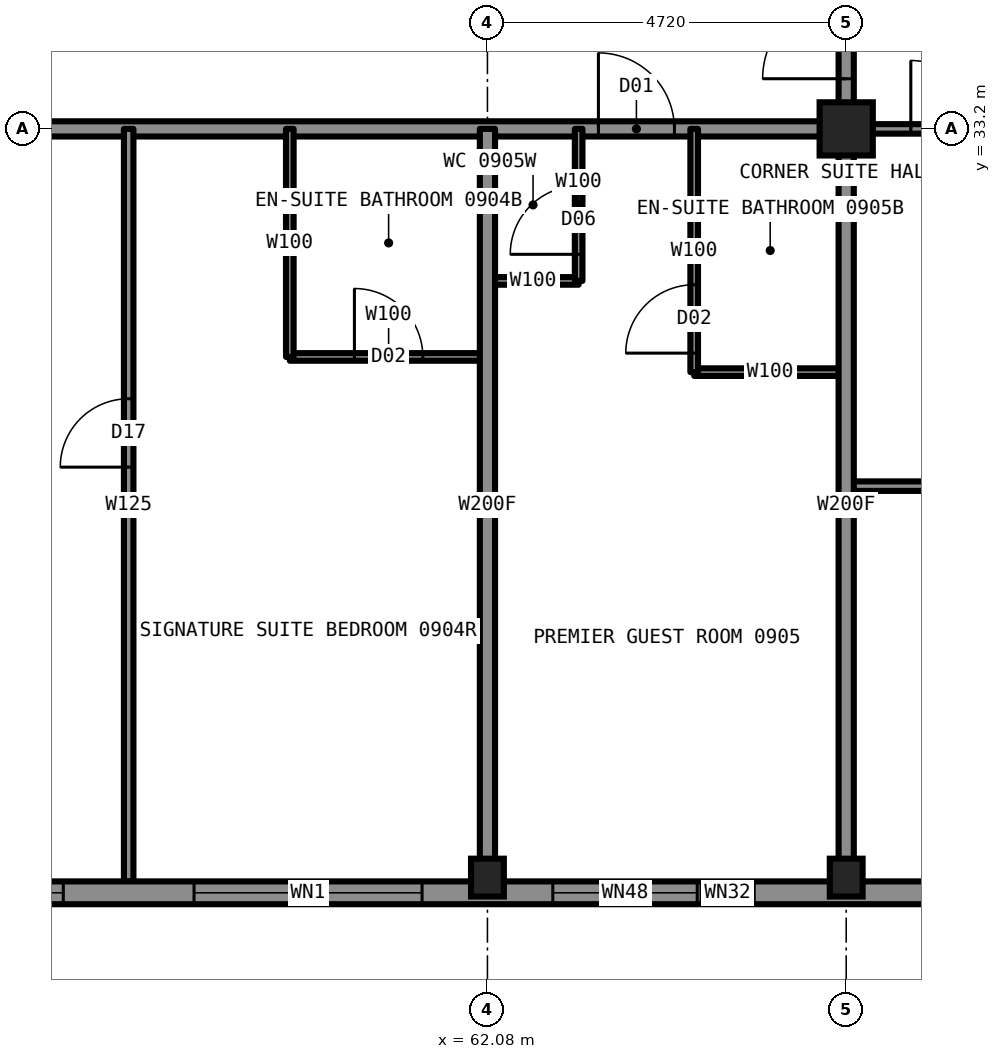
"""IFC4 building model, lengths in metres.
Left out: names, types, materials, properties, quantities, classifications, styles, units other than length and angle.
Written with IfcOpenShell. Run it as: python <this file> out.ifc"""

import sys

from ifc_helpers import new_model, si_unit, direction, frame, frame_2d, origin, origin_2d, place, context, subcontext, project, spatial, rectangle, hollow_rectangle, i_section, extrude, element, fill, save


model = new_model("IFC4")
c1 = context("Model", 3, precision=1e-05, world=origin(), true_north=direction((0.0, 1.0)))
c2 = subcontext(c1, "Body", "Model", "MODEL_VIEW")
j1 = project(units=[si_unit("LENGTHUNIT", "METRE"), si_unit("PLANEANGLEUNIT", "RADIAN")], contexts=[c1])
p1 = place(None, origin())
s1 = spatial("IfcSite", under=j1, at=p1, CompositionType="ELEMENT")
p2 = place(p1, origin())
s2 = spatial("IfcBuilding", under=s1, at=p2, CompositionType="ELEMENT")
p3 = place(p2, frame((0.0, 0.0, 39.0)))
s3 = spatial("IfcBuildingStorey", under=s2, at=p3, CompositionType="ELEMENT", Elevation=39.0)
for number, where, z_axis, x_axis in (
    (1, (62.08, 23.35, 0.0), (0.0, 0.0, 1.0), (1.0, 0.0, 0.0)),
    (2, (66.8, 23.35, 0.0), (0.0, 0.0, 1.0), (1.0, 0.0, 0.0)),
):
    element("IfcColumn", number, at=place(p3, frame(where, z_axis=z_axis, x_axis=x_axis)), inside=s3, PredefinedType="COLUMN", context=c2, shape_type="SweptSolid", body=[
        extrude(i_section(OverallWidth=0.432, OverallDepth=0.498, WebThickness=0.056, FlangeThickness=0.089, at=origin_2d()), origin(), (0.0, 0.0, 1.0), 3.5),
    ])
p4 = place(p3, frame((66.8, 33.2, 0.0), z_axis=(0.0, 0.0, 1.0), x_axis=(1.0, 0.0, 0.0)))
e3 = element("IfcColumn", 3, at=p4, inside=s3, PredefinedType="COLUMN", context=c2, shape_type="SweptSolid", body=[
    extrude(hollow_rectangle(XDim=0.7, YDim=0.7, WallThickness=0.06, at=origin_2d()), origin(), (0.0, 0.0, 1.0), 3.5),
])
p5 = place(p3, frame((43.2, 33.2, 0.0), z_axis=(0.0, 0.0, 1.0), x_axis=(1.0, 0.0, 0.0)))
e4 = element("IfcWall", 4, at=p5, inside=s3, PredefinedType="PARTITIONING", context=c2, shape_type="SweptSolid", body=[
    extrude(rectangle(XDim=23.6, YDim=0.2, at=frame_2d((11.8, 0.0))), origin(), (0.0, 0.0, 1.0), 3.33),
])
p6 = place(p5, frame((2.55, 0.0, 0.0)))
e5 = element("IfcOpeningElement", 5, at=p6, cuts=e4, PredefinedType="OPENING", context=c2, shape_type="SweptSolid", body=[
    extrude(rectangle(XDim=1.0, YDim=2.2, at=frame_2d((0.5, 1.1))), frame((0.0, 0.11, 0.0), z_axis=(0.0, -1.0, 0.0), x_axis=(1.0, 0.0, 0.0)), (0.0, 0.0, 1.0), 0.22),
])
p7 = place(p5, frame((6.57, 0.0, 0.0)))
e6 = element("IfcOpeningElement", 6, at=p7, cuts=e4, PredefinedType="OPENING", context=c2, shape_type="SweptSolid", body=[
    extrude(rectangle(XDim=1.1, YDim=2.2, at=frame_2d((0.55, 1.1))), frame((0.0, 0.11, 0.0), z_axis=(0.0, -1.0, 0.0), x_axis=(1.0, 0.0, 0.0)), (0.0, 0.0, 1.0), 0.22),
])
p8 = place(p5, frame((20.34, 0.0, 0.0)))
e7 = element("IfcOpeningElement", 7, at=p8, cuts=e4, PredefinedType="OPENING", context=c2, shape_type="SweptSolid", body=[
    extrude(rectangle(XDim=1.0, YDim=2.2, at=frame_2d((0.5, 1.1))), frame((0.0, 0.11, 0.0), z_axis=(0.0, -1.0, 0.0), x_axis=(1.0, 0.0, 0.0)), (0.0, 0.0, 1.0), 0.22),
])
p9 = place(p3, frame((66.8, 33.2, 0.0), z_axis=(0.0, 0.0, 1.0), x_axis=(1.0, 0.0, 0.0)))
e8 = element("IfcWall", 8, at=p9, inside=s3, PredefinedType="PARTITIONING", context=c2, shape_type="SweptSolid", body=[
    extrude(rectangle(XDim=9.9, YDim=0.125, at=frame_2d((4.95, 0.0))), origin(), (0.0, 0.0, 1.0), 2.573),
])
p10 = place(p9, frame((0.85, 0.0, 0.0)))
e9 = element("IfcOpeningElement", 9, at=p10, cuts=e8, PredefinedType="OPENING", context=c2, shape_type="SweptSolid", body=[
    extrude(rectangle(XDim=0.9, YDim=2.2, at=frame_2d((0.45, 1.1))), frame((0.0, 0.073, 0.0), z_axis=(0.0, -1.0, 0.0), x_axis=(1.0, 0.0, 0.0)), (0.0, 0.0, 1.0), 0.145),
])
p11 = place(p3, frame((62.08, 31.2, 0.0), z_axis=(0.0, 0.0, 1.0), x_axis=(1.0, 0.0, 0.0)))
e10 = element("IfcWall", 10, at=p11, inside=s3, PredefinedType="PARTITIONING", context=c2, shape_type="SweptSolid", body=[
    extrude(rectangle(XDim=1.2, YDim=0.1, at=frame_2d((0.6, 0.0))), origin(), (0.0, 0.0, 1.0), 3.33),
])
p12 = place(p3, frame((59.48, 30.2, 0.0), z_axis=(0.0, 0.0, 1.0), x_axis=(1.0, 0.0, 0.0)))
e11 = element("IfcWall", 11, at=p12, inside=s3, PredefinedType="PARTITIONING", context=c2, shape_type="SweptSolid", body=[
    extrude(rectangle(XDim=2.6, YDim=0.1, at=frame_2d((1.3, 0.0))), origin(), (0.0, 0.0, 1.0), 3.33),
])
p13 = place(p12, frame((0.85, 0.0, 0.0)))
e12 = element("IfcOpeningElement", 12, at=p13, cuts=e11, PredefinedType="OPENING", context=c2, shape_type="SweptSolid", body=[
    extrude(rectangle(XDim=0.9, YDim=2.1, at=frame_2d((0.45, 1.05))), frame((0.0, 0.06, 0.0), z_axis=(0.0, -1.0, 0.0), x_axis=(1.0, 0.0, 0.0)), (0.0, 0.0, 1.0), 0.12),
])
p14 = place(p3, frame((64.8, 30.0, 0.0), z_axis=(0.0, 0.0, 1.0), x_axis=(1.0, 0.0, 0.0)))
e13 = element("IfcWall", 13, at=p14, inside=s3, PredefinedType="PARTITIONING", context=c2, shape_type="SweptSolid", body=[
    extrude(rectangle(XDim=2.0, YDim=0.1, at=frame_2d((1.0, 0.0))), origin(), (0.0, 0.0, 1.0), 3.33),
])
p15 = place(p3, frame((66.8, 28.5, 0.0), z_axis=(0.0, 0.0, 1.0), x_axis=(1.0, 0.0, 0.0)))
e14 = element("IfcWall", 14, at=p15, inside=s3, PredefinedType="PARTITIONING", context=c2, shape_type="SweptSolid", body=[
    extrude(rectangle(XDim=9.894, YDim=0.125, at=frame_2d((4.947, 0.0))), origin(), (0.0, 0.0, 1.0), 3.33),
])
p16 = place(p15, frame((1.75, 0.0, 0.0)))
e15 = element("IfcOpeningElement", 15, at=p16, cuts=e14, PredefinedType="OPENING", context=c2, shape_type="SweptSolid", body=[
    extrude(rectangle(XDim=0.9, YDim=2.2, at=frame_2d((0.45, 1.1))), frame((0.0, 0.073, 0.0), z_axis=(0.0, -1.0, 0.0), x_axis=(1.0, 0.0, 0.0)), (0.0, 0.0, 1.0), 0.145),
])
p17 = place(p3, frame((66.8, 33.2, 0.0), z_axis=(0.0, 0.0, 1.0), x_axis=(0.0, 1.0, 0.0)))
e16 = element("IfcWall", 16, at=p17, inside=s3, PredefinedType="PARTITIONING", context=c2, shape_type="SweptSolid", body=[
    extrude(rectangle(XDim=23.58, YDim=0.2, at=frame_2d((11.79, 0.0))), origin(), (0.0, 0.0, 1.0), 3.33),
])
p18 = place(p17, frame((7.72, 0.0, 0.0)))
e17 = element("IfcOpeningElement", 17, at=p18, cuts=e16, PredefinedType="OPENING", context=c2, shape_type="SweptSolid", body=[
    extrude(rectangle(XDim=1.0, YDim=2.2, at=frame_2d((0.5, 1.1))), frame((0.0, 0.11, 0.0), z_axis=(0.0, -1.0, 0.0), x_axis=(1.0, 0.0, 0.0)), (0.0, 0.0, 1.0), 0.22),
])
p19 = place(p17, frame((17.31, 0.0, 0.0)))
e18 = element("IfcOpeningElement", 18, at=p19, cuts=e16, PredefinedType="OPENING", context=c2, shape_type="SweptSolid", body=[
    extrude(rectangle(XDim=1.0, YDim=2.2, at=frame_2d((0.5, 1.1))), frame((0.0, 0.11, 0.0), z_axis=(0.0, -1.0, 0.0), x_axis=(1.0, 0.0, 0.0)), (0.0, 0.0, 1.0), 0.22),
])
p20 = place(p17, frame((21.84, 0.0, 0.0)))
e19 = element("IfcOpeningElement", 19, at=p20, cuts=e16, PredefinedType="OPENING", context=c2, shape_type="SweptSolid", body=[
    extrude(rectangle(XDim=1.1, YDim=2.2, at=frame_2d((0.55, 1.1))), frame((0.0, 0.11, 0.0), z_axis=(0.0, -1.0, 0.0), x_axis=(1.0, 0.0, 0.0)), (0.0, 0.0, 1.0), 0.22),
])
p21 = place(p17, frame((0.66, 0.0, 0.0)))
e20 = element("IfcOpeningElement", 20, at=p21, cuts=e16, PredefinedType="OPENING", context=c2, shape_type="SweptSolid", body=[
    extrude(rectangle(XDim=1.1, YDim=2.2, at=frame_2d((0.55, 1.1))), frame((0.0, 0.11, 0.0), z_axis=(0.0, -1.0, 0.0), x_axis=(1.0, 0.0, 0.0)), (0.0, 0.0, 1.0), 0.22),
])
p22 = place(p3, frame((66.8, 23.3, 0.0), z_axis=(0.0, 0.0, 1.0), x_axis=(0.0, 1.0, 0.0)))
e21 = element("IfcWall", 21, at=p22, inside=s3, PredefinedType="PARTITIONING", context=c2, shape_type="SweptSolid", body=[
    extrude(rectangle(XDim=9.9, YDim=0.2, at=frame_2d((4.95, 0.0))), origin(), (0.0, 0.0, 1.0), 2.573),
])
p23 = place(p3, frame((57.36, 23.3, 0.0), z_axis=(0.0, 0.0, 1.0), x_axis=(0.0, 1.0, 0.0)))
e22 = element("IfcWall", 22, at=p23, inside=s3, PredefinedType="PARTITIONING", context=c2, shape_type="SweptSolid", body=[
    extrude(rectangle(XDim=9.9, YDim=0.125, at=frame_2d((4.95, 0.0))), origin(), (0.0, 0.0, 1.0), 3.33),
])
p24 = place(p23, frame((5.45, 0.0, 0.0)))
e23 = element("IfcOpeningElement", 23, at=p24, cuts=e22, PredefinedType="OPENING", context=c2, shape_type="SweptSolid", body=[
    extrude(rectangle(XDim=0.9, YDim=2.2, at=frame_2d((0.45, 1.1))), frame((0.0, 0.073, 0.0), z_axis=(0.0, -1.0, 0.0), x_axis=(1.0, 0.0, 0.0)), (0.0, 0.0, 1.0), 0.145),
])
p25 = place(p3, frame((59.48, 30.2, 0.0), z_axis=(0.0, 0.0, 1.0), x_axis=(0.0, 1.0, 0.0)))
e24 = element("IfcWall", 24, at=p25, inside=s3, PredefinedType="PARTITIONING", context=c2, shape_type="SweptSolid", body=[
    extrude(rectangle(XDim=3.0, YDim=0.1, at=frame_2d((1.5, 0.0))), origin(), (0.0, 0.0, 1.0), 3.33),
])
p26 = place(p3, frame((62.08, 23.3, 0.0), z_axis=(0.0, 0.0, 1.0), x_axis=(0.0, 1.0, 0.0)))
e25 = element("IfcWall", 25, at=p26, inside=s3, PredefinedType="PARTITIONING", context=c2, shape_type="SweptSolid", body=[
    extrude(rectangle(XDim=9.9, YDim=0.2, at=frame_2d((4.95, 0.0))), origin(), (0.0, 0.0, 1.0), 2.573),
])
p27 = place(p3, frame((63.28, 31.2, 0.0), z_axis=(0.0, 0.0, 1.0), x_axis=(0.0, 1.0, 0.0)))
e26 = element("IfcWall", 26, at=p27, inside=s3, PredefinedType="PARTITIONING", context=c2, shape_type="SweptSolid", body=[
    extrude(rectangle(XDim=2.0, YDim=0.1, at=frame_2d((1.0, 0.0))), origin(), (0.0, 0.0, 1.0), 3.33),
])
p28 = place(p27, frame((0.35, 0.0, 0.0)))
e27 = element("IfcOpeningElement", 27, at=p28, cuts=e26, PredefinedType="OPENING", context=c2, shape_type="SweptSolid", body=[
    extrude(rectangle(XDim=0.9, YDim=2.1, at=frame_2d((0.45, 1.05))), frame((0.0, 0.06, 0.0), z_axis=(0.0, -1.0, 0.0), x_axis=(1.0, 0.0, 0.0)), (0.0, 0.0, 1.0), 0.12),
])
p29 = place(p3, frame((64.8, 30.0, 0.0), z_axis=(0.0, 0.0, 1.0), x_axis=(0.0, 1.0, 0.0)))
e28 = element("IfcWall", 28, at=p29, inside=s3, PredefinedType="PARTITIONING", context=c2, shape_type="SweptSolid", body=[
    extrude(rectangle(XDim=3.2, YDim=0.1, at=frame_2d((1.6, 0.0))), origin(), (0.0, 0.0, 1.0), 3.33),
])
p30 = place(p29, frame((0.25, 0.0, 0.0)))
e29 = element("IfcOpeningElement", 29, at=p30, cuts=e28, PredefinedType="OPENING", context=c2, shape_type="SweptSolid", body=[
    extrude(rectangle(XDim=0.9, YDim=2.1, at=frame_2d((0.45, 1.05))), frame((0.0, 0.06, 0.0), z_axis=(0.0, -1.0, 0.0), x_axis=(1.0, 0.0, 0.0)), (0.0, 0.0, 1.0), 0.12),
])
p31 = place(p3, frame((38.5, 23.15, 0.0), z_axis=(0.0, 0.0, 1.0), x_axis=(1.0, 0.0, 0.0)))
e30 = element("IfcWall", 30, at=p31, inside=s3, PredefinedType="SOLIDWALL", context=c2, shape_type="SweptSolid", body=[
    extrude(rectangle(XDim=33.0, YDim=0.3, at=frame_2d((16.5, 0.0))), origin(), (0.0, 0.0, 1.0), 2.83),
])
p32 = place(p31, frame((0.85, 0.0, 0.5)))
e31 = element("IfcOpeningElement", 31, at=p32, cuts=e30, PredefinedType="OPENING", context=c2, shape_type="SweptSolid", body=[
    extrude(rectangle(XDim=2.5, YDim=2.0, at=frame_2d((1.25, 1.0))), frame((0.0, 0.16, 0.0), z_axis=(0.0, -1.0, 0.0), x_axis=(1.0, 0.0, 0.0)), (0.0, 0.0, 1.0), 0.32),
])
p33 = place(p31, frame((6.61, 0.0, 0.5)))
e32 = element("IfcOpeningElement", 32, at=p33, cuts=e30, PredefinedType="OPENING", context=c2, shape_type="SweptSolid", body=[
    extrude(rectangle(XDim=1.9, YDim=1.9, at=frame_2d((0.95, 0.95))), frame((0.0, 0.16, 0.0), z_axis=(0.0, -1.0, 0.0), x_axis=(1.0, 0.0, 0.0)), (0.0, 0.0, 1.0), 0.32),
])
p34 = place(p31, frame((10.28, 0.0, 0.5)))
e33 = element("IfcOpeningElement", 33, at=p34, cuts=e30, PredefinedType="OPENING", context=c2, shape_type="SweptSolid", body=[
    extrude(rectangle(XDim=3.0, YDim=2.0, at=frame_2d((1.5, 1.0))), frame((0.0, 0.16, 0.0), z_axis=(0.0, -1.0, 0.0), x_axis=(1.0, 0.0, 0.0)), (0.0, 0.0, 1.0), 0.32),
])
p35 = place(p31, frame((15.0, 0.0, 0.5)))
e34 = element("IfcOpeningElement", 34, at=p35, cuts=e30, PredefinedType="OPENING", context=c2, shape_type="SweptSolid", body=[
    extrude(rectangle(XDim=3.0, YDim=2.0, at=frame_2d((1.5, 1.0))), frame((0.0, 0.16, 0.0), z_axis=(0.0, -1.0, 0.0), x_axis=(1.0, 0.0, 0.0)), (0.0, 0.0, 1.0), 0.32),
])
p36 = place(p31, frame((19.72, 0.0, 0.5)))
e35 = element("IfcOpeningElement", 35, at=p36, cuts=e30, PredefinedType="OPENING", context=c2, shape_type="SweptSolid", body=[
    extrude(rectangle(XDim=3.0, YDim=2.0, at=frame_2d((1.5, 1.0))), frame((0.0, 0.16, 0.0), z_axis=(0.0, -1.0, 0.0), x_axis=(1.0, 0.0, 0.0)), (0.0, 0.0, 1.0), 0.32),
])
p37 = place(p31, frame((24.44, 0.0, 0.5)))
e36 = element("IfcOpeningElement", 36, at=p37, cuts=e30, PredefinedType="OPENING", context=c2, shape_type="SweptSolid", body=[
    extrude(rectangle(XDim=1.9, YDim=1.9, at=frame_2d((0.95, 0.95))), frame((0.0, 0.16, 0.0), z_axis=(0.0, -1.0, 0.0), x_axis=(1.0, 0.0, 0.0)), (0.0, 0.0, 1.0), 0.32),
])
p38 = place(p31, frame((29.6, 0.0, 0.5)))
e37 = element("IfcOpeningElement", 37, at=p38, cuts=e30, PredefinedType="OPENING", context=c2, shape_type="SweptSolid", body=[
    extrude(rectangle(XDim=2.5, YDim=2.0, at=frame_2d((1.25, 1.0))), frame((0.0, 0.16, 0.0), z_axis=(0.0, -1.0, 0.0), x_axis=(1.0, 0.0, 0.0)), (0.0, 0.0, 1.0), 0.32),
])
p39 = place(p31, frame((5.91, 0.0, 0.5)))
e38 = element("IfcOpeningElement", 38, at=p39, cuts=e30, PredefinedType="OPENING", context=c2, shape_type="SweptSolid", body=[
    extrude(rectangle(XDim=0.7, YDim=1.0, at=frame_2d((0.35, 0.5))), frame((0.0, 0.16, 0.0), z_axis=(0.0, -1.0, 0.0), x_axis=(1.0, 0.0, 0.0)), (0.0, 0.0, 1.0), 0.32),
])
p40 = place(p31, frame((26.39, 0.0, 0.5)))
e39 = element("IfcOpeningElement", 39, at=p40, cuts=e30, PredefinedType="OPENING", context=c2, shape_type="SweptSolid", body=[
    extrude(rectangle(XDim=0.7, YDim=1.0, at=frame_2d((0.35, 0.5))), frame((0.0, 0.16, 0.0), z_axis=(0.0, -1.0, 0.0), x_axis=(1.0, 0.0, 0.0)), (0.0, 0.0, 1.0), 0.32),
])
p41 = place(p13, origin())
e40 = element("IfcDoor", 40, at=p41, inside=s3, OperationType="SINGLE_SWING_RIGHT", PredefinedType="DOOR", context=c2, shape_type="SweptSolid", body=[
    extrude(rectangle(XDim=0.9, YDim=2.1, at=frame_2d((0.45, 1.05))), frame((0.0, 0.025, 0.0), z_axis=(0.0, -1.0, 0.0), x_axis=(1.0, 0.0, 0.0)), (0.0, 0.0, 1.0), 0.05),
])
fill(e12, e40)
p42 = place(p24, origin())
e41 = element("IfcDoor", 41, at=p42, inside=s3, OperationType="SINGLE_SWING_LEFT", PredefinedType="DOOR", context=c2, shape_type="SweptSolid", body=[
    extrude(rectangle(XDim=0.9, YDim=2.2, at=frame_2d((0.45, 1.1))), frame((0.0, 0.025, 0.0), z_axis=(0.0, -1.0, 0.0), x_axis=(1.0, 0.0, 0.0)), (0.0, 0.0, 1.0), 0.05),
])
fill(e23, e41)
p43 = place(p8, origin())
e42 = element("IfcDoor", 42, at=p43, inside=s3, OperationType="SINGLE_SWING_LEFT", PredefinedType="DOOR", context=c2, shape_type="SweptSolid", body=[
    extrude(rectangle(XDim=1.0, YDim=2.2, at=frame_2d((0.5, 1.1))), frame((0.0, 0.025, 0.0), z_axis=(0.0, -1.0, 0.0), x_axis=(1.0, 0.0, 0.0)), (0.0, 0.0, 1.0), 0.05),
])
fill(e7, e42)
p44 = place(p30, origin())
e43 = element("IfcDoor", 43, at=p44, inside=s3, OperationType="SINGLE_SWING_RIGHT", PredefinedType="DOOR", context=c2, shape_type="SweptSolid", body=[
    extrude(rectangle(XDim=0.9, YDim=2.1, at=frame_2d((0.45, 1.05))), frame((0.0, 0.025, 0.0), z_axis=(0.0, -1.0, 0.0), x_axis=(1.0, 0.0, 0.0)), (0.0, 0.0, 1.0), 0.05),
])
fill(e29, e43)
p45 = place(p28, origin())
e44 = element("IfcDoor", 44, at=p45, inside=s3, OperationType="SINGLE_SWING_LEFT", PredefinedType="DOOR", context=c2, shape_type="SweptSolid", body=[
    extrude(rectangle(XDim=0.9, YDim=2.1, at=frame_2d((0.45, 1.05))), frame((0.0, 0.025, 0.0), z_axis=(0.0, -1.0, 0.0), x_axis=(1.0, 0.0, 0.0)), (0.0, 0.0, 1.0), 0.05),
])
fill(e27, e44)
p46 = place(p10, origin())
e45 = element("IfcDoor", 45, at=p46, inside=s3, OperationType="SINGLE_SWING_LEFT", PredefinedType="DOOR", context=c2, shape_type="SweptSolid", body=[
    extrude(rectangle(XDim=0.9, YDim=2.2, at=frame_2d((0.45, 1.1))), frame((0.0, 0.025, 0.0), z_axis=(0.0, -1.0, 0.0), x_axis=(1.0, 0.0, 0.0)), (0.0, 0.0, 1.0), 0.05),
])
fill(e9, e45)
p47 = place(p21, origin())
e46 = element("IfcDoor", 46, at=p47, inside=s3, OperationType="SINGLE_SWING_LEFT", PredefinedType="DOOR", context=c2, shape_type="SweptSolid", body=[
    extrude(rectangle(XDim=1.1, YDim=2.2, at=frame_2d((0.55, 1.1))), frame((0.0, 0.025, 0.0), z_axis=(0.0, -1.0, 0.0), x_axis=(1.0, 0.0, 0.0)), (0.0, 0.0, 1.0), 0.05),
])
fill(e20, e46)
p48 = place(p35, origin())
e47 = element("IfcWindow", 47, at=p48, inside=s3, PartitioningType="SINGLE_PANEL", PredefinedType="WINDOW", context=c2, shape_type="SweptSolid", body=[
    extrude(rectangle(XDim=3.0, YDim=2.0, at=frame_2d((1.5, 1.0))), frame((0.0, 0.03, 0.0), z_axis=(0.0, -1.0, 0.0), x_axis=(1.0, 0.0, 0.0)), (0.0, 0.0, 1.0), 0.06),
])
fill(e34, e47)
p49 = place(p36, origin())
e48 = element("IfcWindow", 48, at=p49, inside=s3, PartitioningType="SINGLE_PANEL", PredefinedType="WINDOW", context=c2, shape_type="SweptSolid", body=[
    extrude(rectangle(XDim=3.0, YDim=2.0, at=frame_2d((1.5, 1.0))), frame((0.0, 0.03, 0.0), z_axis=(0.0, -1.0, 0.0), x_axis=(1.0, 0.0, 0.0)), (0.0, 0.0, 1.0), 0.06),
])
fill(e35, e48)
p50 = place(p37, origin())
e49 = element("IfcWindow", 49, at=p50, inside=s3, PartitioningType="SINGLE_PANEL", PredefinedType="WINDOW", context=c2, shape_type="SweptSolid", body=[
    extrude(rectangle(XDim=1.9, YDim=1.9, at=frame_2d((0.95, 0.95))), frame((0.0, 0.03, 0.0), z_axis=(0.0, -1.0, 0.0), x_axis=(1.0, 0.0, 0.0)), (0.0, 0.0, 1.0), 0.06),
])
fill(e36, e49)
p51 = place(p40, origin())
e50 = element("IfcWindow", 50, at=p51, inside=s3, PartitioningType="SINGLE_PANEL", PredefinedType="WINDOW", context=c2, shape_type="SweptSolid", body=[
    extrude(rectangle(XDim=0.7, YDim=1.0, at=frame_2d((0.35, 0.5))), frame((0.0, 0.03, 0.0), z_axis=(0.0, -1.0, 0.0), x_axis=(1.0, 0.0, 0.0)), (0.0, 0.0, 1.0), 0.06),
])
fill(e39, e50)
save(model, sys.argv[1])
